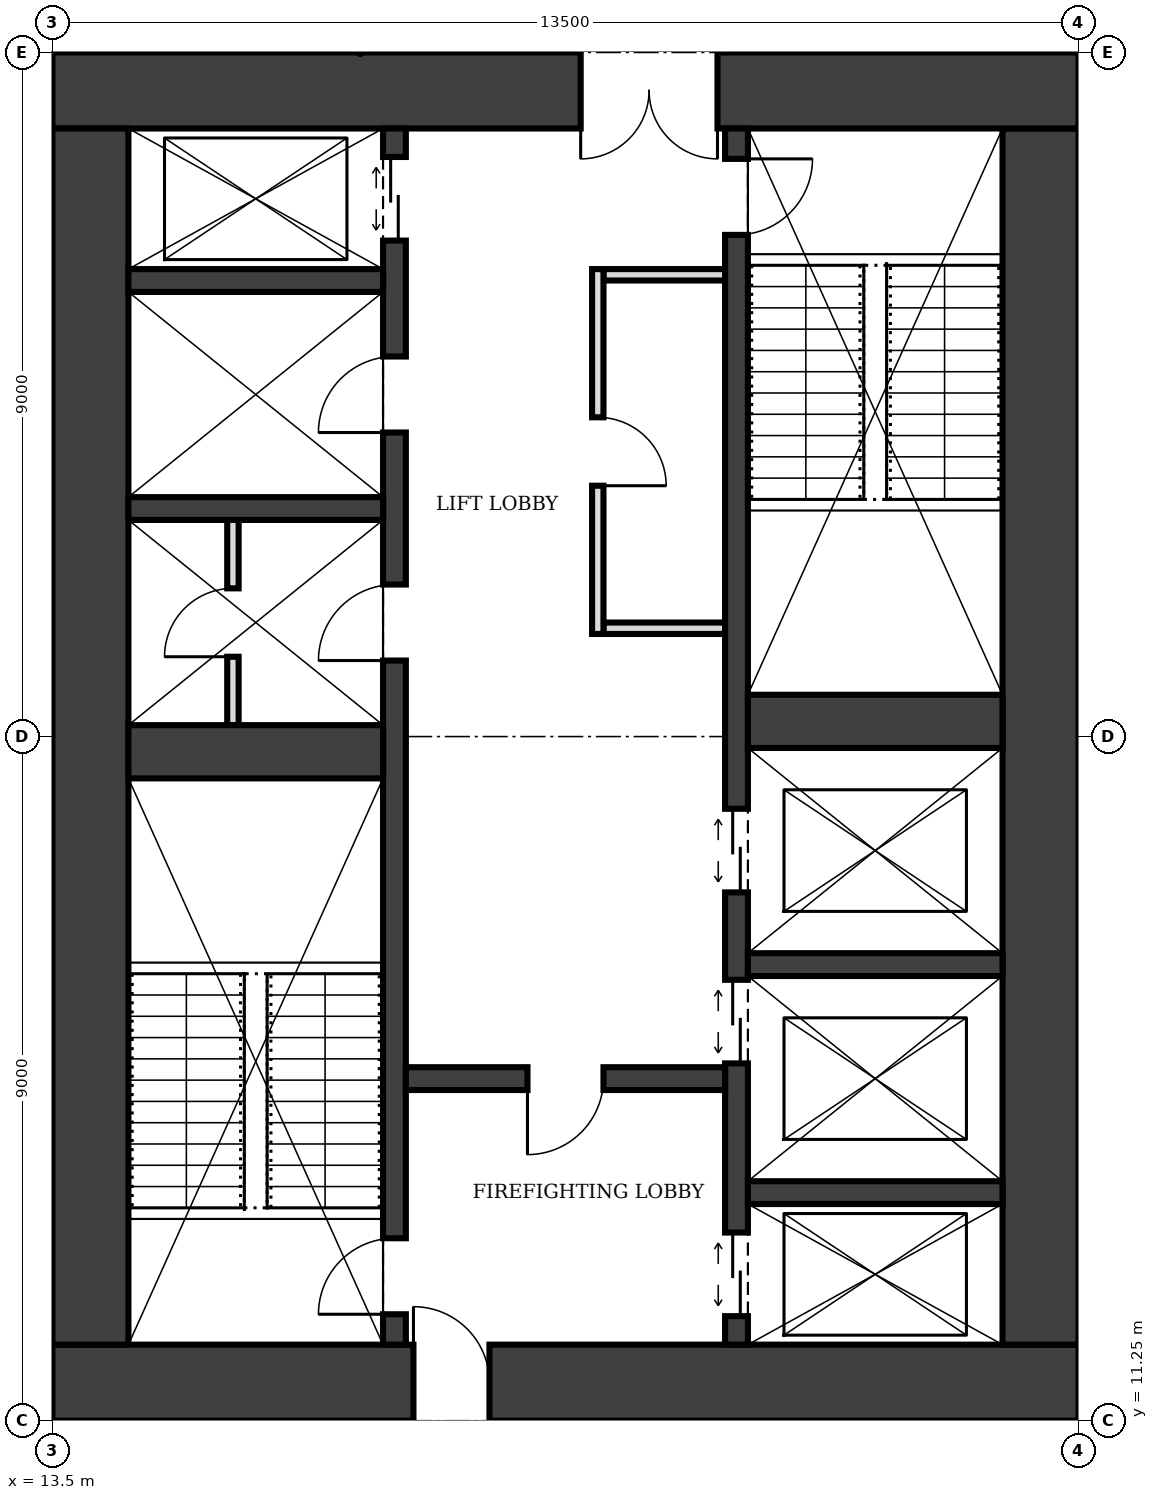
"""IFC4 building model, lengths in metres.
Left out: names, types, materials, properties, quantities, classifications, styles, units other than length and angle.
Written with IfcOpenShell. Run it as: python <this file> out.ifc"""

import sys

from ifc_helpers import new_model, si_unit, direction, frame, frame_2d, origin, place, context, subcontext, project, spatial, rectangle, extrude, element, fill, save


model = new_model("IFC4")
c1 = context("Model", 3, precision=1e-05, world=origin(), true_north=direction((0.0, 1.0)))
c2 = subcontext(c1, "Body", "Model", "MODEL_VIEW")
j1 = project(units=[si_unit("LENGTHUNIT", "METRE"), si_unit("PLANEANGLEUNIT", "RADIAN")], contexts=[c1])
p1 = place(None, origin())
s1 = spatial("IfcSite", under=j1, at=p1, CompositionType="ELEMENT")
p2 = place(p1, origin())
s2 = spatial("IfcBuilding", under=s1, at=p2, CompositionType="ELEMENT")
p3 = place(p2, frame((0.0, 0.0, 209.0)))
s3 = spatial("IfcBuildingStorey", under=s2, at=p3, CompositionType="ELEMENT", Elevation=209.0)
p4 = place(p3, frame((13.5, 11.75, 0.0), z_axis=(0.0, 0.0, 1.0), x_axis=(1.0, 0.0, 0.0)))
e1 = element("IfcWall", 1, at=p4, inside=s3, PredefinedType="SHEAR", context=c2, shape_type="SweptSolid", body=[
    extrude(rectangle(XDim=13.5, YDim=1.0, at=frame_2d((6.75, 0.0))), origin(), (0.0, 0.0, 1.0), 4.0),
])
p5 = place(p4, frame((4.75, 0.0, 0.0)))
e2 = element("IfcOpeningElement", 2, at=p5, cuts=e1, PredefinedType="OPENING", context=c2, shape_type="SweptSolid", body=[
    extrude(rectangle(XDim=1.0, YDim=2.1, at=frame_2d((0.5, 1.05))), frame((0.0, 0.51, 0.0), z_axis=(0.0, -1.0, 0.0), x_axis=(1.0, 0.0, 0.0)), (0.0, 0.0, 1.0), 1.02),
])
p6 = place(p3, frame((26.5, 12.25, 0.0), z_axis=(0.0, 0.0, 1.0), x_axis=(0.0, 1.0, 0.0)))
e3 = element("IfcWall", 3, at=p6, inside=s3, PredefinedType="SHEAR", context=c2, shape_type="SweptSolid", body=[
    extrude(rectangle(XDim=16.0, YDim=1.0, at=frame_2d((8.0, 0.0))), origin(), (0.0, 0.0, 1.0), 4.0),
])
p7 = place(p3, frame((27.0, 28.75, 0.0), z_axis=(0.0, 0.0, 1.0), x_axis=(-1.0, 0.0, 0.0)))
e4 = element("IfcWall", 4, at=p7, inside=s3, PredefinedType="SHEAR", context=c2, shape_type="SweptSolid", body=[
    extrude(rectangle(XDim=13.5, YDim=1.0, at=frame_2d((6.75, 0.0))), origin(), (0.0, 0.0, 1.0), 4.0),
])
p8 = place(p7, frame((4.75, 0.0, 0.0)))
e5 = element("IfcOpeningElement", 5, at=p8, cuts=e4, PredefinedType="OPENING", context=c2, shape_type="SweptSolid", body=[
    extrude(rectangle(XDim=1.8, YDim=2.1, at=frame_2d((0.9, 1.05))), frame((0.0, 0.51, 0.0), z_axis=(0.0, -1.0, 0.0), x_axis=(1.0, 0.0, 0.0)), (0.0, 0.0, 1.0), 1.02),
])
p9 = place(p3, frame((14.0, 28.25, 0.0), z_axis=(0.0, 0.0, 1.0), x_axis=(0.0, -1.0, 0.0)))
e6 = element("IfcWall", 6, at=p9, inside=s3, PredefinedType="SHEAR", context=c2, shape_type="SweptSolid", body=[
    extrude(rectangle(XDim=16.0, YDim=1.0, at=frame_2d((8.0, 0.0))), origin(), (0.0, 0.0, 1.0), 4.0),
])
p10 = place(p3, frame((18.0, 12.25, 0.0), z_axis=(0.0, 0.0, 1.0), x_axis=(0.0, 1.0, 0.0)))
e7 = element("IfcWall", 7, at=p10, inside=s3, PredefinedType="SHEAR", context=c2, shape_type="SweptSolid", body=[
    extrude(rectangle(XDim=16.0, YDim=0.3, at=frame_2d((8.0, 0.0))), origin(), (0.0, 0.0, 1.0), 4.0),
])
p11 = place(p10, frame((0.4, 0.0, 0.0)))
e8 = element("IfcOpeningElement", 8, at=p11, cuts=e7, PredefinedType="OPENING", context=c2, shape_type="SweptSolid", body=[
    extrude(rectangle(XDim=1.0, YDim=2.1, at=frame_2d((0.5, 1.05))), frame((0.0, 0.16, 0.0), z_axis=(0.0, -1.0, 0.0), x_axis=(1.0, 0.0, 0.0)), (0.0, 0.0, 1.0), 0.32),
])
p12 = place(p10, frame((14.525, 0.0, 0.0)))
e9 = element("IfcOpeningElement", 9, at=p12, cuts=e7, PredefinedType="OPENING", context=c2, shape_type="SweptSolid", body=[
    extrude(rectangle(XDim=1.1, YDim=2.1, at=frame_2d((0.55, 1.05))), frame((0.0, 0.16, 0.0), z_axis=(0.0, -1.0, 0.0), x_axis=(1.0, 0.0, 0.0)), (0.0, 0.0, 1.0), 0.32),
])
p13 = place(p10, frame((9.0, 0.0, 0.0)))
e10 = element("IfcOpeningElement", 10, at=p13, cuts=e7, PredefinedType="OPENING", context=c2, shape_type="SweptSolid", body=[
    extrude(rectangle(XDim=1.0, YDim=2.1, at=frame_2d((0.5, 1.05))), frame((0.0, 0.16, 0.0), z_axis=(0.0, -1.0, 0.0), x_axis=(1.0, 0.0, 0.0)), (0.0, 0.0, 1.0), 0.32),
])
p14 = place(p10, frame((12.0, 0.0, 0.0)))
e11 = element("IfcOpeningElement", 11, at=p14, cuts=e7, PredefinedType="OPENING", context=c2, shape_type="SweptSolid", body=[
    extrude(rectangle(XDim=1.0, YDim=2.1, at=frame_2d((0.5, 1.05))), frame((0.0, 0.16, 0.0), z_axis=(0.0, -1.0, 0.0), x_axis=(1.0, 0.0, 0.0)), (0.0, 0.0, 1.0), 0.32),
])
p15 = place(p3, frame((22.5, 12.25, 0.0), z_axis=(0.0, 0.0, 1.0), x_axis=(0.0, 1.0, 0.0)))
e12 = element("IfcWall", 12, at=p15, inside=s3, PredefinedType="SHEAR", context=c2, shape_type="SweptSolid", body=[
    extrude(rectangle(XDim=16.0, YDim=0.3, at=frame_2d((8.0, 0.0))), origin(), (0.0, 0.0, 1.0), 4.0),
])
p16 = place(p15, frame((14.6, 0.0, 0.0)))
e13 = element("IfcOpeningElement", 13, at=p16, cuts=e12, PredefinedType="OPENING", context=c2, shape_type="SweptSolid", body=[
    extrude(rectangle(XDim=1.0, YDim=2.1, at=frame_2d((0.5, 1.05))), frame((0.0, 0.16, 0.0), z_axis=(0.0, -1.0, 0.0), x_axis=(1.0, 0.0, 0.0)), (0.0, 0.0, 1.0), 0.32),
])
p17 = place(p15, frame((0.375, 0.0, 0.0)))
e14 = element("IfcOpeningElement", 14, at=p17, cuts=e12, PredefinedType="OPENING", context=c2, shape_type="SweptSolid", body=[
    extrude(rectangle(XDim=1.1, YDim=2.1, at=frame_2d((0.55, 1.05))), frame((0.0, 0.16, 0.0), z_axis=(0.0, -1.0, 0.0), x_axis=(1.0, 0.0, 0.0)), (0.0, 0.0, 1.0), 0.32),
])
p18 = place(p15, frame((3.7, 0.0, 0.0)))
e15 = element("IfcOpeningElement", 15, at=p18, cuts=e12, PredefinedType="OPENING", context=c2, shape_type="SweptSolid", body=[
    extrude(rectangle(XDim=1.1, YDim=2.1, at=frame_2d((0.55, 1.05))), frame((0.0, 0.16, 0.0), z_axis=(0.0, -1.0, 0.0), x_axis=(1.0, 0.0, 0.0)), (0.0, 0.0, 1.0), 0.32),
])
p19 = place(p15, frame((5.95, 0.0, 0.0)))
e16 = element("IfcOpeningElement", 16, at=p19, cuts=e12, PredefinedType="OPENING", context=c2, shape_type="SweptSolid", body=[
    extrude(rectangle(XDim=1.1, YDim=2.1, at=frame_2d((0.55, 1.05))), frame((0.0, 0.16, 0.0), z_axis=(0.0, -1.0, 0.0), x_axis=(1.0, 0.0, 0.0)), (0.0, 0.0, 1.0), 0.32),
])
p20 = place(p3, frame((14.5, 20.05, 0.0), z_axis=(0.0, 0.0, 1.0), x_axis=(1.0, 0.0, 0.0)))
e17 = element("IfcWall", 17, at=p20, inside=s3, PredefinedType="SHEAR", context=c2, shape_type="SweptSolid", body=[
    extrude(rectangle(XDim=3.35, YDim=0.7, at=frame_2d((1.675, 0.0))), origin(), (0.0, 0.0, 1.0), 4.0),
])
p21 = place(p3, frame((18.15, 15.75, 0.0), z_axis=(0.0, 0.0, 1.0), x_axis=(1.0, 0.0, 0.0)))
e18 = element("IfcWall", 18, at=p21, inside=s3, PredefinedType="SHEAR", context=c2, shape_type="SweptSolid", body=[
    extrude(rectangle(XDim=4.2, YDim=0.3, at=frame_2d((2.1, 0.0))), origin(), (0.0, 0.0, 1.0), 4.0),
])
p22 = place(p21, frame((1.6, 0.0, 0.0)))
e19 = element("IfcOpeningElement", 19, at=p22, cuts=e18, PredefinedType="OPENING", context=c2, shape_type="SweptSolid", body=[
    extrude(rectangle(XDim=1.0, YDim=2.1, at=frame_2d((0.5, 1.05))), frame((0.0, 0.16, 0.0), z_axis=(0.0, -1.0, 0.0), x_axis=(1.0, 0.0, 0.0)), (0.0, 0.0, 1.0), 0.32),
])
for number, where, z_axis, x_axis in (
    (20, (22.65, 14.25, 0.0), (0.0, 0.0, 1.0), (1.0, 0.0, 0.0)),
    (21, (22.65, 17.25, 0.0), (0.0, 0.0, 1.0), (1.0, 0.0, 0.0)),
):
    element("IfcWall", number, at=place(p3, frame(where, z_axis=z_axis, x_axis=x_axis)), inside=s3, PredefinedType="SHEAR", context=c2, shape_type="SweptSolid", body=[
        extrude(rectangle(XDim=3.35, YDim=0.3, at=frame_2d((1.675, 0.0))), origin(), (0.0, 0.0, 1.0), 4.0),
    ])
p23 = place(p3, frame((22.65, 20.45, 0.0), z_axis=(0.0, 0.0, 1.0), x_axis=(1.0, 0.0, 0.0)))
e22 = element("IfcWall", 22, at=p23, inside=s3, PredefinedType="SHEAR", context=c2, shape_type="SweptSolid", body=[
    extrude(rectangle(XDim=3.35, YDim=0.7, at=frame_2d((1.675, 0.0))), origin(), (0.0, 0.0, 1.0), 4.0),
])
for number, where, z_axis, x_axis in (
    (23, (14.5, 23.25, 0.0), (0.0, 0.0, 1.0), (1.0, 0.0, 0.0)),
    (24, (14.5, 26.25, 0.0), (0.0, 0.0, 1.0), (1.0, 0.0, 0.0)),
):
    element("IfcWall", number, at=place(p3, frame(where, z_axis=z_axis, x_axis=x_axis)), inside=s3, PredefinedType="SHEAR", context=c2, shape_type="SweptSolid", body=[
        extrude(rectangle(XDim=3.35, YDim=0.3, at=frame_2d((1.675, 0.0))), origin(), (0.0, 0.0, 1.0), 4.0),
    ])
p24 = place(p3, frame((20.675, 21.6, 0.0), z_axis=(0.0, 0.0, 1.0), x_axis=(0.0, 1.0, 0.0)))
e25 = element("IfcWall", 25, at=p24, inside=s3, PredefinedType="PARTITIONING", context=c2, shape_type="SweptSolid", body=[
    extrude(rectangle(XDim=4.8, YDim=0.15, at=frame_2d((2.4, 0.0))), origin(), (0.0, 0.0, 1.0), 3.75),
])
p25 = place(p24, frame((1.95, 0.0, 0.0)))
e26 = element("IfcOpeningElement", 26, at=p25, cuts=e25, PredefinedType="OPENING", context=c2, shape_type="SweptSolid", body=[
    extrude(rectangle(XDim=0.9, YDim=2.1, at=frame_2d((0.45, 1.05))), frame((0.0, 0.085, 0.0), z_axis=(0.0, -1.0, 0.0), x_axis=(1.0, 0.0, 0.0)), (0.0, 0.0, 1.0), 0.17),
])
for number, where, z_axis, x_axis in (
    (27, (20.75, 21.675, 0.0), (0.0, 0.0, 1.0), (1.0, 0.0, 0.0)),
    (28, (20.75, 26.325, 0.0), (0.0, 0.0, 1.0), (1.0, 0.0, 0.0)),
):
    element("IfcWall", number, at=place(p3, frame(where, z_axis=z_axis, x_axis=x_axis)), inside=s3, PredefinedType="PARTITIONING", context=c2, shape_type="SweptSolid", body=[
        extrude(rectangle(XDim=1.6, YDim=0.15, at=frame_2d((0.8, 0.0))), origin(), (0.0, 0.0, 1.0), 3.75),
    ])
p26 = place(p3, frame((15.875, 20.4, 0.0), z_axis=(0.0, 0.0, 1.0), x_axis=(0.0, 1.0, 0.0)))
e29 = element("IfcWall", 29, at=p26, inside=s3, PredefinedType="PARTITIONING", context=c2, shape_type="SweptSolid", body=[
    extrude(rectangle(XDim=2.7, YDim=0.15, at=frame_2d((1.35, 0.0))), origin(), (0.0, 0.0, 1.0), 3.75),
])
p27 = place(p26, frame((0.9, 0.0, 0.0)))
e30 = element("IfcOpeningElement", 30, at=p27, cuts=e29, PredefinedType="OPENING", context=c2, shape_type="SweptSolid", body=[
    extrude(rectangle(XDim=0.9, YDim=2.1, at=frame_2d((0.45, 1.05))), frame((0.0, 0.085, 0.0), z_axis=(0.0, -1.0, 0.0), x_axis=(1.0, 0.0, 0.0)), (0.0, 0.0, 1.0), 0.17),
])
p28 = place(p5, origin())
e31 = element("IfcDoor", 31, at=p28, inside=s3, OperationType="SINGLE_SWING_LEFT", PredefinedType="DOOR", context=c2, shape_type="SweptSolid", body=[
    extrude(rectangle(XDim=1.0, YDim=2.1, at=frame_2d((0.5, 1.05))), frame((0.0, 0.025, 0.0), z_axis=(0.0, -1.0, 0.0), x_axis=(1.0, 0.0, 0.0)), (0.0, 0.0, 1.0), 0.05),
])
fill(e2, e31)
p29 = place(p8, origin())
e32 = element("IfcDoor", 32, at=p29, inside=s3, OperationType="DOUBLE_DOOR_SINGLE_SWING", PredefinedType="DOOR", context=c2, shape_type="SweptSolid", body=[
    extrude(rectangle(XDim=1.8, YDim=2.1, at=frame_2d((0.9, 1.05))), frame((0.0, 0.025, 0.0), z_axis=(0.0, -1.0, 0.0), x_axis=(1.0, 0.0, 0.0)), (0.0, 0.0, 1.0), 0.05),
])
fill(e5, e32)
p30 = place(p22, frame((1.0, 0.0, 0.0), z_axis=(0.0, 0.0, 1.0), x_axis=(-1.0, 0.0, 0.0)))
e33 = element("IfcDoor", 33, at=p30, inside=s3, OperationType="SINGLE_SWING_RIGHT", PredefinedType="DOOR", context=c2, shape_type="SweptSolid", body=[
    extrude(rectangle(XDim=1.0, YDim=2.1, at=frame_2d((0.5, 1.05))), frame((0.0, 0.025, 0.0), z_axis=(0.0, -1.0, 0.0), x_axis=(1.0, 0.0, 0.0)), (0.0, 0.0, 1.0), 0.05),
])
fill(e19, e33)
p31 = place(p11, origin())
e34 = element("IfcDoor", 34, at=p31, inside=s3, OperationType="SINGLE_SWING_LEFT", PredefinedType="DOOR", context=c2, shape_type="SweptSolid", body=[
    extrude(rectangle(XDim=1.0, YDim=2.1, at=frame_2d((0.5, 1.05))), frame((0.0, 0.025, 0.0), z_axis=(0.0, -1.0, 0.0), x_axis=(1.0, 0.0, 0.0)), (0.0, 0.0, 1.0), 0.05),
])
fill(e8, e34)
p32 = place(p16, frame((1.0, 0.0, 0.0), z_axis=(0.0, 0.0, 1.0), x_axis=(-1.0, 0.0, 0.0)))
e35 = element("IfcDoor", 35, at=p32, inside=s3, OperationType="SINGLE_SWING_LEFT", PredefinedType="DOOR", context=c2, shape_type="SweptSolid", body=[
    extrude(rectangle(XDim=1.0, YDim=2.1, at=frame_2d((0.5, 1.05))), frame((0.0, 0.025, 0.0), z_axis=(0.0, -1.0, 0.0), x_axis=(1.0, 0.0, 0.0)), (0.0, 0.0, 1.0), 0.05),
])
fill(e13, e35)
p33 = place(p17, origin())
e36 = element("IfcDoor", 36, at=p33, inside=s3, OperationType="DOUBLE_DOOR_SLIDING", PredefinedType="DOOR", context=c2, shape_type="SweptSolid", body=[
    extrude(rectangle(XDim=1.1, YDim=2.1, at=frame_2d((0.55, 1.05))), frame((0.0, 0.025, 0.0), z_axis=(0.0, -1.0, 0.0), x_axis=(1.0, 0.0, 0.0)), (0.0, 0.0, 1.0), 0.05),
])
fill(e14, e36)
p34 = place(p12, origin())
e37 = element("IfcDoor", 37, at=p34, inside=s3, OperationType="DOUBLE_DOOR_SLIDING", PredefinedType="DOOR", context=c2, shape_type="SweptSolid", body=[
    extrude(rectangle(XDim=1.1, YDim=2.1, at=frame_2d((0.55, 1.05))), frame((0.0, 0.025, 0.0), z_axis=(0.0, -1.0, 0.0), x_axis=(1.0, 0.0, 0.0)), (0.0, 0.0, 1.0), 0.05),
])
fill(e9, e37)
p35 = place(p18, origin())
e38 = element("IfcDoor", 38, at=p35, inside=s3, OperationType="DOUBLE_DOOR_SLIDING", PredefinedType="DOOR", context=c2, shape_type="SweptSolid", body=[
    extrude(rectangle(XDim=1.1, YDim=2.1, at=frame_2d((0.55, 1.05))), frame((0.0, 0.025, 0.0), z_axis=(0.0, -1.0, 0.0), x_axis=(1.0, 0.0, 0.0)), (0.0, 0.0, 1.0), 0.05),
])
fill(e15, e38)
p36 = place(p19, origin())
e39 = element("IfcDoor", 39, at=p36, inside=s3, OperationType="DOUBLE_DOOR_SLIDING", PredefinedType="DOOR", context=c2, shape_type="SweptSolid", body=[
    extrude(rectangle(XDim=1.1, YDim=2.1, at=frame_2d((0.55, 1.05))), frame((0.0, 0.025, 0.0), z_axis=(0.0, -1.0, 0.0), x_axis=(1.0, 0.0, 0.0)), (0.0, 0.0, 1.0), 0.05),
])
fill(e16, e39)
p37 = place(p25, frame((0.9, 0.0, 0.0), z_axis=(0.0, 0.0, 1.0), x_axis=(-1.0, 0.0, 0.0)))
e40 = element("IfcDoor", 40, at=p37, inside=s3, OperationType="SINGLE_SWING_RIGHT", PredefinedType="DOOR", context=c2, shape_type="SweptSolid", body=[
    extrude(rectangle(XDim=0.9, YDim=2.1, at=frame_2d((0.45, 1.05))), frame((0.0, 0.025, 0.0), z_axis=(0.0, -1.0, 0.0), x_axis=(1.0, 0.0, 0.0)), (0.0, 0.0, 1.0), 0.05),
])
fill(e26, e40)
p38 = place(p13, origin())
e41 = element("IfcDoor", 41, at=p38, inside=s3, OperationType="SINGLE_SWING_LEFT", PredefinedType="DOOR", context=c2, shape_type="SweptSolid", body=[
    extrude(rectangle(XDim=1.0, YDim=2.1, at=frame_2d((0.5, 1.05))), frame((0.0, 0.025, 0.0), z_axis=(0.0, -1.0, 0.0), x_axis=(1.0, 0.0, 0.0)), (0.0, 0.0, 1.0), 0.05),
])
fill(e10, e41)
p39 = place(p27, origin())
e42 = element("IfcDoor", 42, at=p39, inside=s3, OperationType="SINGLE_SWING_LEFT", PredefinedType="DOOR", context=c2, shape_type="SweptSolid", body=[
    extrude(rectangle(XDim=0.9, YDim=2.1, at=frame_2d((0.45, 1.05))), frame((0.0, 0.025, 0.0), z_axis=(0.0, -1.0, 0.0), x_axis=(1.0, 0.0, 0.0)), (0.0, 0.0, 1.0), 0.05),
])
fill(e30, e42)
p40 = place(p14, origin())
e43 = element("IfcDoor", 43, at=p40, inside=s3, OperationType="SINGLE_SWING_LEFT", PredefinedType="DOOR", context=c2, shape_type="SweptSolid", body=[
    extrude(rectangle(XDim=1.0, YDim=2.1, at=frame_2d((0.5, 1.05))), frame((0.0, 0.025, 0.0), z_axis=(0.0, -1.0, 0.0), x_axis=(1.0, 0.0, 0.0)), (0.0, 0.0, 1.0), 0.05),
])
fill(e11, e43)
save(model, sys.argv[1])
